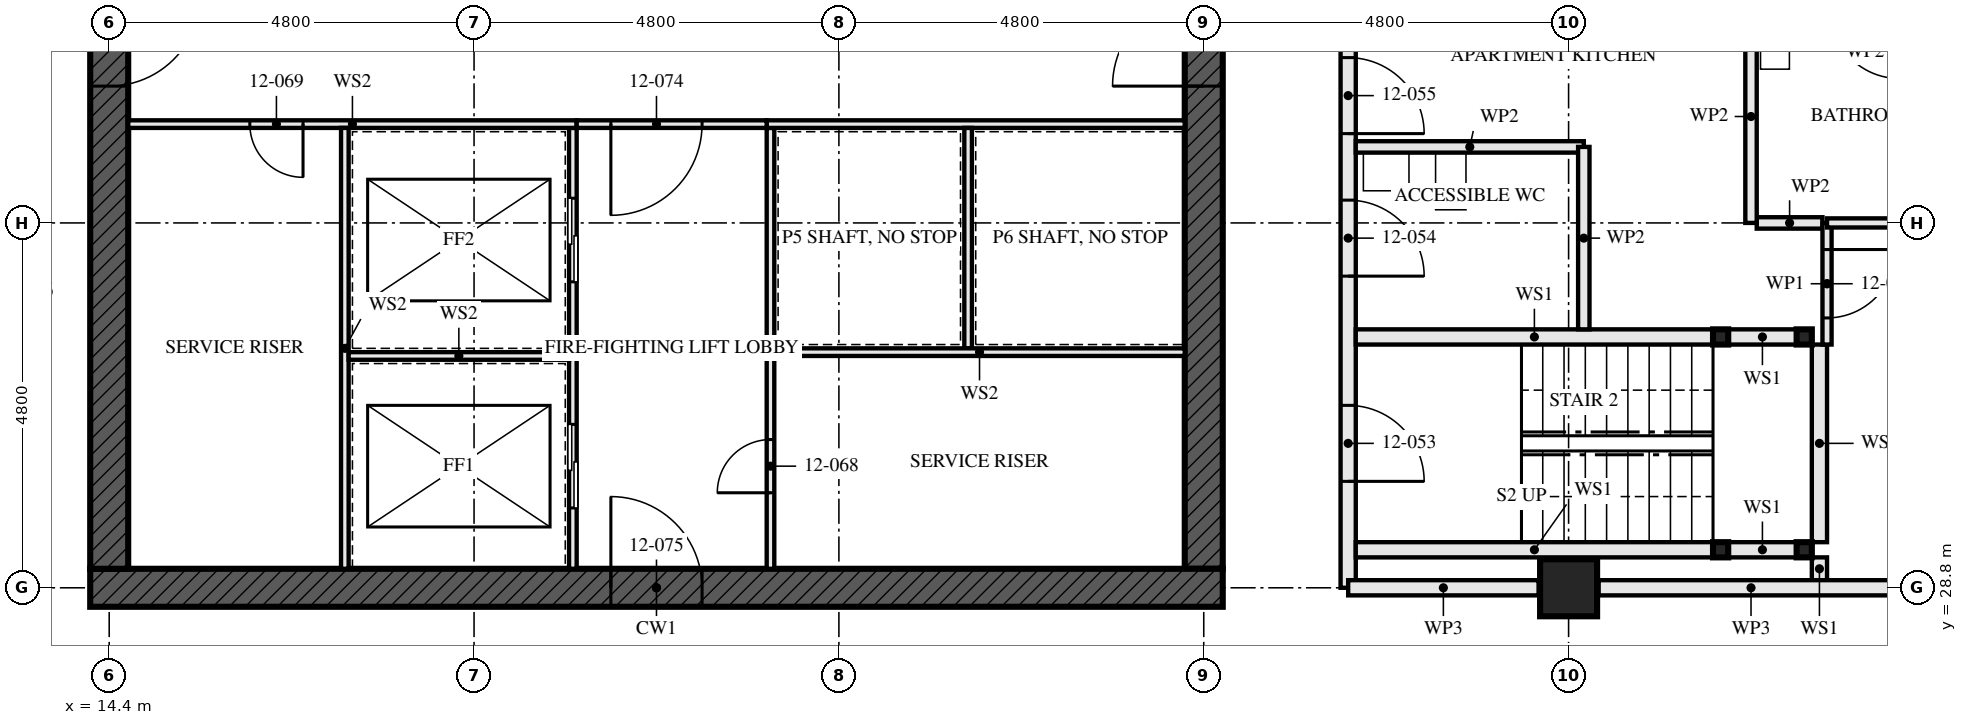
"""IFC4 building model, lengths in metres.
Left out: names, types, materials, properties, quantities, classifications, styles, units other than length and angle.
Written with IfcOpenShell. Run it as: python <this file> out.ifc"""

import sys

from ifc_helpers import new_model, si_unit, direction, frame, frame_2d, origin, origin_2d, place, context, subcontext, project, spatial, rectangle, hollow_rectangle, extrude, element, fill, save


model = new_model("IFC4")
c1 = context("Model", 3, precision=1e-05, world=origin(), true_north=direction((0.0, 1.0)))
c2 = subcontext(c1, "Body", "Model", "MODEL_VIEW")
j1 = project(units=[si_unit("LENGTHUNIT", "METRE"), si_unit("PLANEANGLEUNIT", "RADIAN")], contexts=[c1])
p1 = place(None, origin())
s1 = spatial("IfcSite", under=j1, at=p1, CompositionType="ELEMENT")
p2 = place(p1, origin())
s2 = spatial("IfcBuilding", under=s1, at=p2, CompositionType="ELEMENT")
p3 = place(p2, frame((0.0, 0.0, 48.0)))
s3 = spatial("IfcBuildingStorey", under=s2, at=p3, CompositionType="ELEMENT", Elevation=48.0)
p4 = place(p3, frame((33.6, 28.8, 0.0), z_axis=(0.0, 0.0, 1.0), x_axis=(0.0, 1.0, 0.0)))
e1 = element("IfcColumn", 1, at=p4, inside=s3, PredefinedType="COLUMN", context=c2, shape_type="SweptSolid", body=[
    extrude(hollow_rectangle(XDim=0.75, YDim=0.75, WallThickness=0.08, at=origin_2d()), origin(), (0.0, 0.0, 1.0), 3.5),
])
p5 = place(p3, frame((14.15, 28.8, -0.17), z_axis=(0.0, 0.0, 1.0), x_axis=(1.0, 0.0, 0.0)))
e2 = element("IfcWall", 2, at=p5, inside=s3, PredefinedType="SHEAR", context=c2, shape_type="SweptSolid", body=[
    extrude(rectangle(XDim=14.9, YDim=0.5, at=frame_2d((7.45, 0.0))), origin(), (0.0, 0.0, 1.0), 3.5),
])
p6 = place(p5, frame((6.85, 0.0, 0.17)))
e3 = element("IfcOpeningElement", 3, at=p6, cuts=e2, PredefinedType="OPENING", context=c2, shape_type="SweptSolid", body=[
    extrude(rectangle(XDim=1.2, YDim=2.1, at=frame_2d((0.6, 1.05))), frame((0.0, 0.26, 0.0), z_axis=(0.0, -1.0, 0.0), x_axis=(1.0, 0.0, 0.0)), (0.0, 0.0, 1.0), 0.521),
])
p7 = place(p3, frame((14.4, 42.95, -0.17), z_axis=(0.0, 0.0, 1.0), x_axis=(0.0, -1.0, 0.0)))
e4 = element("IfcWall", 4, at=p7, inside=s3, PredefinedType="SHEAR", context=c2, shape_type="SweptSolid", body=[
    extrude(rectangle(XDim=13.9, YDim=0.5, at=frame_2d((6.95, 0.0))), origin(), (0.0, 0.0, 1.0), 3.5),
])
p8 = place(p7, frame((6.35, 0.0, 0.17)))
e5 = element("IfcOpeningElement", 5, at=p8, cuts=e4, PredefinedType="OPENING", context=c2, shape_type="SweptSolid", body=[
    extrude(rectangle(XDim=1.2, YDim=2.1, at=frame_2d((0.6, 1.05))), frame((0.0, 0.26, 0.0), z_axis=(0.0, -1.0, 0.0), x_axis=(1.0, 0.0, 0.0)), (0.0, 0.0, 1.0), 0.521),
])
p9 = place(p3, frame((28.8, 29.05, -0.17), z_axis=(0.0, 0.0, 1.0), x_axis=(0.0, 1.0, 0.0)))
e6 = element("IfcWall", 6, at=p9, inside=s3, PredefinedType="SHEAR", context=c2, shape_type="SweptSolid", body=[
    extrude(rectangle(XDim=13.9, YDim=0.5, at=frame_2d((6.95, 0.0))), origin(), (0.0, 0.0, 1.0), 3.5),
])
p10 = place(p9, frame((6.35, 0.0, 0.17)))
e7 = element("IfcOpeningElement", 7, at=p10, cuts=e6, PredefinedType="OPENING", context=c2, shape_type="SweptSolid", body=[
    extrude(rectangle(XDim=1.2, YDim=2.1, at=frame_2d((0.6, 1.05))), frame((0.0, 0.26, 0.0), z_axis=(0.0, -1.0, 0.0), x_axis=(1.0, 0.0, 0.0)), (0.0, 0.0, 1.0), 0.521),
])
for number, where, z_axis, x_axis in (
    (8, (36.7, 29.3, 0.0), (0.0, 0.0, 1.0), (1.0, 0.0, 0.0)),
    (9, (36.7, 32.1, 0.0), (0.0, 0.0, 1.0), (1.0, 0.0, 0.0)),
    (10, (35.6, 29.3, 0.0), (0.0, 0.0, 1.0), (1.0, 0.0, 0.0)),
    (11, (35.6, 32.1, 0.0), (0.0, 0.0, 1.0), (1.0, 0.0, 0.0)),
):
    element("IfcColumn", number, at=place(p3, frame(where, z_axis=z_axis, x_axis=x_axis)), inside=s3, PredefinedType="COLUMN", context=c2, shape_type="SweptSolid", body=[
        extrude(hollow_rectangle(XDim=0.2, YDim=0.2, WallThickness=0.008, at=origin_2d()), origin(), (0.0, 0.0, 1.0), 3.33),
    ])
p11 = place(p3, frame((36.6, 29.3, 0.0), z_axis=(0.0, 0.0, 1.0), x_axis=(-1.0, 0.0, 0.0)))
e12 = element("IfcWall", 12, at=p11, inside=s3, PredefinedType="SOLIDWALL", context=c2, shape_type="SweptSolid", body=[
    extrude(rectangle(XDim=0.9, YDim=0.2, at=frame_2d((0.45, 0.0))), origin(), (0.0, 0.0, 1.0), 2.99),
])
p12 = place(p3, frame((35.5, 29.3, 0.0), z_axis=(0.0, 0.0, 1.0), x_axis=(-1.0, 0.0, 0.0)))
e13 = element("IfcWall", 13, at=p12, inside=s3, PredefinedType="SOLIDWALL", context=c2, shape_type="SweptSolid", body=[
    extrude(rectangle(XDim=4.7, YDim=0.2, at=frame_2d((2.35, 0.0))), origin(), (0.0, 0.0, 1.0), 2.99),
])
p13 = place(p3, frame((36.6, 32.1, 0.0), z_axis=(0.0, 0.0, 1.0), x_axis=(-1.0, 0.0, 0.0)))
e14 = element("IfcWall", 14, at=p13, inside=s3, PredefinedType="SOLIDWALL", context=c2, shape_type="SweptSolid", body=[
    extrude(rectangle(XDim=0.9, YDim=0.2, at=frame_2d((0.45, 0.0))), origin(), (0.0, 0.0, 1.0), 2.99),
])
p14 = place(p3, frame((35.5, 32.1, 0.0), z_axis=(0.0, 0.0, 1.0), x_axis=(-1.0, 0.0, 0.0)))
e15 = element("IfcWall", 15, at=p14, inside=s3, PredefinedType="SOLIDWALL", context=c2, shape_type="SweptSolid", body=[
    extrude(rectangle(XDim=4.7, YDim=0.2, at=frame_2d((2.35, 0.0))), origin(), (0.0, 0.0, 1.0), 2.99),
])
p15 = place(p3, frame((36.9, 28.9, 0.0), z_axis=(0.0, 0.0, 1.0), x_axis=(0.0, 1.0, 0.0)))
e16 = element("IfcWall", 16, at=p15, inside=s3, PredefinedType="SOLIDWALL", context=c2, shape_type="SweptSolid", body=[
    extrude(rectangle(XDim=0.3, YDim=0.2, at=frame_2d((0.15, 0.0))), origin(), (0.0, 0.0, 1.0), 3.33),
])
p16 = place(p3, frame((36.9, 29.4, 0.0), z_axis=(0.0, 0.0, 1.0), x_axis=(0.0, 1.0, 0.0)))
e17 = element("IfcWall", 17, at=p16, inside=s3, PredefinedType="SOLIDWALL", context=c2, shape_type="SweptSolid", body=[
    extrude(rectangle(XDim=2.6, YDim=0.2, at=frame_2d((1.3, 0.0))), origin(), (0.0, 0.0, 1.0), 3.33),
])
p17 = place(p3, frame((33.8, 32.2, 0.0), z_axis=(0.0, 0.0, 1.0), x_axis=(0.0, 1.0, 0.0)))
e18 = element("IfcWall", 18, at=p17, inside=s3, PredefinedType="PARTITIONING", context=c2, shape_type="SweptSolid", body=[
    extrude(rectangle(XDim=2.4, YDim=0.15, at=frame_2d((1.2, 0.0))), origin(), (0.0, 0.0, 1.0), 2.55),
])
p18 = place(p3, frame((33.8, 34.6, 0.0), z_axis=(0.0, 0.0, 1.0), x_axis=(-1.0, 0.0, 0.0)))
e19 = element("IfcWall", 19, at=p18, inside=s3, PredefinedType="PARTITIONING", context=c2, shape_type="SweptSolid", body=[
    extrude(rectangle(XDim=3.0, YDim=0.15, at=frame_2d((1.5, 0.0))), origin(), (0.0, 0.0, 1.0), 3.33),
])
p19 = place(p3, frame((36.0, 33.6, 0.0), z_axis=(0.0, 0.0, 1.0), x_axis=(0.0, 1.0, 0.0)))
e20 = element("IfcWall", 20, at=p19, inside=s3, PredefinedType="PARTITIONING", context=c2, shape_type="SweptSolid", body=[
    extrude(rectangle(XDim=2.8, YDim=0.15, at=frame_2d((1.4, 0.0))), origin(), (0.0, 0.0, 1.0), 3.33),
])
p20 = place(p3, frame((37.0, 32.0, 0.0), z_axis=(0.0, 0.0, 1.0), x_axis=(0.0, 1.0, 0.0)))
e21 = element("IfcWall", 21, at=p20, inside=s3, PredefinedType="PARTITIONING", context=c2, shape_type="SweptSolid", body=[
    extrude(rectangle(XDim=1.6, YDim=0.12, at=frame_2d((0.8, 0.0))), origin(), (0.0, 0.0, 1.0), 3.33),
])
p21 = place(p20, frame((0.35, 0.0, 0.0)))
e22 = element("IfcOpeningElement", 22, at=p21, cuts=e21, PredefinedType="OPENING", context=c2, shape_type="SweptSolid", body=[
    extrude(rectangle(XDim=0.9, YDim=2.1, at=frame_2d((0.45, 1.05))), frame((0.0, 0.071, 0.0), z_axis=(0.0, -1.0, 0.0), x_axis=(1.0, 0.0, 0.0)), (0.0, 0.0, 1.0), 0.141),
])
p22 = place(p3, frame((42.805, 33.6, 0.0), z_axis=(0.0, 0.0, 1.0), x_axis=(-1.0, 0.0, 0.0)))
e23 = element("IfcWall", 23, at=p22, inside=s3, PredefinedType="PARTITIONING", context=c2, shape_type="SweptSolid", body=[
    extrude(rectangle(XDim=5.805, YDim=0.12, at=frame_2d((2.902, 0.0))), origin(), (0.0, 0.0, 1.0), 2.55),
])
p23 = place(p3, frame((30.7, 28.8, 0.0), z_axis=(0.0, 0.0, 1.0), x_axis=(0.0, 1.0, 0.0)))
e24 = element("IfcWall", 24, at=p23, inside=s3, PredefinedType="PARTITIONING", context=c2, shape_type="SweptSolid", body=[
    extrude(rectangle(XDim=14.4, YDim=0.2, at=frame_2d((7.2, 0.0))), origin(), (0.0, 0.0, 1.0), 2.55),
])
p24 = place(p23, frame((1.4, 0.0, 0.0)))
e25 = element("IfcOpeningElement", 25, at=p24, cuts=e24, PredefinedType="OPENING", context=c2, shape_type="SweptSolid", body=[
    extrude(rectangle(XDim=1.0, YDim=2.1, at=frame_2d((0.5, 1.05))), frame((0.0, 0.111, 0.0), z_axis=(0.0, -1.0, 0.0), x_axis=(1.0, 0.0, 0.0)), (0.0, 0.0, 1.0), 0.221),
])
p25 = place(p23, frame((4.1, 0.0, 0.0)))
e26 = element("IfcOpeningElement", 26, at=p25, cuts=e24, PredefinedType="OPENING", context=c2, shape_type="SweptSolid", body=[
    extrude(rectangle(XDim=1.0, YDim=2.1, at=frame_2d((0.5, 1.05))), frame((0.0, 0.111, 0.0), z_axis=(0.0, -1.0, 0.0), x_axis=(1.0, 0.0, 0.0)), (0.0, 0.0, 1.0), 0.221),
])
p26 = place(p23, frame((5.975, 0.0, 0.0)))
e27 = element("IfcOpeningElement", 27, at=p26, cuts=e24, PredefinedType="OPENING", context=c2, shape_type="SweptSolid", body=[
    extrude(rectangle(XDim=1.0, YDim=2.1, at=frame_2d((0.5, 1.05))), frame((0.0, 0.111, 0.0), z_axis=(0.0, -1.0, 0.0), x_axis=(1.0, 0.0, 0.0)), (0.0, 0.0, 1.0), 0.221),
])
p27 = place(p23, frame((10.0, 0.0, 0.0)))
e28 = element("IfcOpeningElement", 28, at=p27, cuts=e24, PredefinedType="OPENING", context=c2, shape_type="SweptSolid", body=[
    extrude(rectangle(XDim=1.0, YDim=2.1, at=frame_2d((0.5, 1.05))), frame((0.0, 0.111, 0.0), z_axis=(0.0, -1.0, 0.0), x_axis=(1.0, 0.0, 0.0)), (0.0, 0.0, 1.0), 0.221),
])
p28 = place(p3, frame((20.5, 29.05, 0.0), z_axis=(0.0, 0.0, 1.0), x_axis=(0.0, 1.0, 0.0)))
e29 = element("IfcWall", 29, at=p28, inside=s3, PredefinedType="SOLIDWALL", context=c2, shape_type="SweptSolid", body=[
    extrude(rectangle(XDim=5.8, YDim=0.1, at=frame_2d((2.9, 0.0))), origin(), (0.0, 0.0, 1.0), 3.33),
])
p29 = place(p28, frame((0.8, 0.0, 0.0)))
e30 = element("IfcOpeningElement", 30, at=p29, cuts=e29, PredefinedType="OPENING", context=c2, shape_type="SweptSolid", body=[
    extrude(rectangle(XDim=1.1, YDim=2.3, at=frame_2d((0.55, 1.15))), frame((0.0, 0.061, 0.0), z_axis=(0.0, -1.0, 0.0), x_axis=(1.0, 0.0, 0.0)), (0.0, 0.0, 1.0), 0.121),
])
p30 = place(p28, frame((3.775, 0.0, 0.0)))
e31 = element("IfcOpeningElement", 31, at=p30, cuts=e29, PredefinedType="OPENING", context=c2, shape_type="SweptSolid", body=[
    extrude(rectangle(XDim=1.1, YDim=2.3, at=frame_2d((0.55, 1.15))), frame((0.0, 0.061, 0.0), z_axis=(0.0, -1.0, 0.0), x_axis=(1.0, 0.0, 0.0)), (0.0, 0.0, 1.0), 0.121),
])
p31 = place(p3, frame((23.1, 29.05, 0.0), z_axis=(0.0, 0.0, 1.0), x_axis=(0.0, 1.0, 0.0)))
e32 = element("IfcWall", 32, at=p31, inside=s3, PredefinedType="SOLIDWALL", context=c2, shape_type="SweptSolid", body=[
    extrude(rectangle(XDim=5.8, YDim=0.1, at=frame_2d((2.9, 0.0))), origin(), (0.0, 0.0, 1.0), 3.33),
])
p32 = place(p31, frame((1.0, 0.0, 0.0)))
e33 = element("IfcOpeningElement", 33, at=p32, cuts=e32, PredefinedType="OPENING", context=c2, shape_type="SweptSolid", body=[
    extrude(rectangle(XDim=0.7, YDim=2.1, at=frame_2d((0.35, 1.05))), frame((0.0, 0.061, 0.0), z_axis=(0.0, -1.0, 0.0), x_axis=(1.0, 0.0, 0.0)), (0.0, 0.0, 1.0), 0.121),
])
p33 = place(p3, frame((14.65, 34.9, 0.0), z_axis=(0.0, 0.0, 1.0), x_axis=(1.0, 0.0, 0.0)))
e34 = element("IfcWall", 34, at=p33, inside=s3, PredefinedType="SOLIDWALL", context=c2, shape_type="SweptSolid", body=[
    extrude(rectangle(XDim=5.9, YDim=0.1, at=frame_2d((2.95, 0.0))), origin(), (0.0, 0.0, 1.0), 3.33),
])
p34 = place(p33, frame((1.6, 0.0, 0.0)))
e35 = element("IfcOpeningElement", 35, at=p34, cuts=e34, PredefinedType="OPENING", context=c2, shape_type="SweptSolid", body=[
    extrude(rectangle(XDim=0.7, YDim=2.1, at=frame_2d((0.35, 1.05))), frame((0.0, 0.061, 0.0), z_axis=(0.0, -1.0, 0.0), x_axis=(1.0, 0.0, 0.0)), (0.0, 0.0, 1.0), 0.121),
])
p35 = place(p3, frame((23.05, 34.9, 0.0), z_axis=(0.0, 0.0, 1.0), x_axis=(1.0, 0.0, 0.0)))
e36 = element("IfcWall", 36, at=p35, inside=s3, PredefinedType="SOLIDWALL", context=c2, shape_type="SweptSolid", body=[
    extrude(rectangle(XDim=5.5, YDim=0.1, at=frame_2d((2.75, 0.0))), origin(), (0.0, 0.0, 1.0), 3.33),
])
p36 = place(p3, frame((20.55, 34.9, 0.0), z_axis=(0.0, 0.0, 1.0), x_axis=(1.0, 0.0, 0.0)))
e37 = element("IfcWall", 37, at=p36, inside=s3, PredefinedType="SOLIDWALL", context=c2, shape_type="SweptSolid", body=[
    extrude(rectangle(XDim=2.5, YDim=0.1, at=frame_2d((1.25, 0.0))), origin(), (0.0, 0.0, 1.0), 3.33),
])
p37 = place(p36, frame((0.45, 0.0, 0.0)))
e38 = element("IfcOpeningElement", 38, at=p37, cuts=e37, PredefinedType="OPENING", context=c2, shape_type="SweptSolid", body=[
    extrude(rectangle(XDim=1.2, YDim=2.1, at=frame_2d((0.6, 1.05))), frame((0.0, 0.061, 0.0), z_axis=(0.0, -1.0, 0.0), x_axis=(1.0, 0.0, 0.0)), (0.0, 0.0, 1.0), 0.121),
])
p38 = place(p3, frame((17.5, 29.05, 0.0), z_axis=(0.0, 0.0, 1.0), x_axis=(0.0, 1.0, 0.0)))
e39 = element("IfcWall", 39, at=p38, inside=s3, PredefinedType="SOLIDWALL", context=c2, shape_type="SweptSolid", body=[
    extrude(rectangle(XDim=5.8, YDim=0.1, at=frame_2d((2.9, 0.0))), origin(), (0.0, 0.0, 1.0), 3.33),
])
p39 = place(p3, frame((17.55, 31.85, 0.0), z_axis=(0.0, 0.0, 1.0), x_axis=(1.0, 0.0, 0.0)))
e40 = element("IfcWall", 40, at=p39, inside=s3, PredefinedType="SOLIDWALL", context=c2, shape_type="SweptSolid", body=[
    extrude(rectangle(XDim=2.9, YDim=0.1, at=frame_2d((1.45, 0.0))), origin(), (0.0, 0.0, 1.0), 3.33),
])
p40 = place(p3, frame((25.7, 31.95, 0.0), z_axis=(0.0, 0.0, 1.0), x_axis=(0.0, 1.0, 0.0)))
e41 = element("IfcWall", 41, at=p40, inside=s3, PredefinedType="SOLIDWALL", context=c2, shape_type="SweptSolid", body=[
    extrude(rectangle(XDim=2.9, YDim=0.1, at=frame_2d((1.45, 0.0))), origin(), (0.0, 0.0, 1.0), 3.33),
])
p41 = place(p3, frame((23.15, 31.9, 0.0), z_axis=(0.0, 0.0, 1.0), x_axis=(1.0, 0.0, 0.0)))
e42 = element("IfcWall", 42, at=p41, inside=s3, PredefinedType="SOLIDWALL", context=c2, shape_type="SweptSolid", body=[
    extrude(rectangle(XDim=5.4, YDim=0.1, at=frame_2d((2.7, 0.0))), origin(), (0.0, 0.0, 1.0), 3.33),
])
p42 = place(p3, frame((38.005, 28.8, 0.0), z_axis=(0.0, 0.0, 1.0), x_axis=(-1.0, 0.0, 0.0)))
e43 = element("IfcWall", 43, at=p42, inside=s3, PredefinedType="PARTITIONING", context=c2, shape_type="SweptSolid", body=[
    extrude(rectangle(XDim=4.01, YDim=0.2, at=frame_2d((2.005, 0.0))), origin(), (0.0, 0.0, 1.0), 2.32),
])
p43 = place(p3, frame((33.205, 28.8, 0.0), z_axis=(0.0, 0.0, 1.0), x_axis=(-1.0, 0.0, 0.0)))
e44 = element("IfcWall", 44, at=p43, inside=s3, PredefinedType="PARTITIONING", context=c2, shape_type="SweptSolid", body=[
    extrude(rectangle(XDim=2.505, YDim=0.2, at=frame_2d((1.252, 0.0))), origin(), (0.0, 0.0, 1.0), 2.32),
])
p44 = place(p3, frame((36.94, 33.6, 0.0), z_axis=(0.0, 0.0, 1.0), x_axis=(-1.0, 0.0, 0.0)))
e45 = element("IfcWall", 45, at=p44, inside=s3, PredefinedType="PARTITIONING", context=c2, shape_type="SweptSolid", body=[
    extrude(rectangle(XDim=0.865, YDim=0.15, at=frame_2d((0.433, 0.0))), origin(), (0.0, 0.0, 1.0), 2.55),
])
p45 = place(p21, frame((0.9, 0.0, 0.0), z_axis=(0.0, 0.0, 1.0), x_axis=(-1.0, 0.0, 0.0)))
e46 = element("IfcDoor", 46, at=p45, inside=s3, OperationType="SINGLE_SWING_RIGHT", PredefinedType="DOOR", context=c2, shape_type="SweptSolid", body=[
    extrude(rectangle(XDim=0.9, YDim=2.1, at=frame_2d((0.45, 1.05))), frame((0.0, 0.022, 0.0), z_axis=(0.0, -1.0, 0.0), x_axis=(1.0, 0.0, 0.0)), (0.0, 0.0, 1.0), 0.044),
])
fill(e22, e46)
p46 = place(p24, frame((1.0, 0.0, 0.0), z_axis=(0.0, 0.0, 1.0), x_axis=(-1.0, 0.0, 0.0)))
e47 = element("IfcDoor", 47, at=p46, inside=s3, OperationType="SINGLE_SWING_LEFT", PredefinedType="DOOR", context=c2, shape_type="SweptSolid", body=[
    extrude(rectangle(XDim=1.0, YDim=2.1, at=frame_2d((0.5, 1.05))), frame((0.0, 0.032, 0.0), z_axis=(0.0, -1.0, 0.0), x_axis=(1.0, 0.0, 0.0)), (0.0, 0.0, 1.0), 0.064),
])
fill(e25, e47)
p47 = place(p25, frame((1.0, 0.0, 0.0), z_axis=(0.0, 0.0, 1.0), x_axis=(-1.0, 0.0, 0.0)))
e48 = element("IfcDoor", 48, at=p47, inside=s3, OperationType="SINGLE_SWING_LEFT", PredefinedType="DOOR", context=c2, shape_type="SweptSolid", body=[
    extrude(rectangle(XDim=1.0, YDim=2.1, at=frame_2d((0.5, 1.05))), frame((0.0, 0.027, 0.0), z_axis=(0.0, -1.0, 0.0), x_axis=(1.0, 0.0, 0.0)), (0.0, 0.0, 1.0), 0.054),
])
fill(e26, e48)
p48 = place(p26, frame((1.0, 0.0, 0.0), z_axis=(0.0, 0.0, 1.0), x_axis=(-1.0, 0.0, 0.0)))
e49 = element("IfcDoor", 49, at=p48, inside=s3, OperationType="SINGLE_SWING_LEFT", PredefinedType="DOOR", context=c2, shape_type="SweptSolid", body=[
    extrude(rectangle(XDim=1.0, YDim=2.1, at=frame_2d((0.5, 1.05))), frame((0.0, 0.027, 0.0), z_axis=(0.0, -1.0, 0.0), x_axis=(1.0, 0.0, 0.0)), (0.0, 0.0, 1.0), 0.054),
])
fill(e27, e49)
p49 = place(p29, origin())
e50 = element("IfcDoor", 50, at=p49, inside=s3, OperationType="SLIDING_TO_LEFT", PredefinedType="DOOR", context=c2, shape_type="SweptSolid", body=[
    extrude(rectangle(XDim=1.1, YDim=2.3, at=frame_2d((0.55, 1.15))), frame((0.0, 0.05, 0.0), z_axis=(0.0, -1.0, 0.0), x_axis=(1.0, 0.0, 0.0)), (0.0, 0.0, 1.0), 0.1),
])
fill(e30, e50)
p50 = place(p30, origin())
e51 = element("IfcDoor", 51, at=p50, inside=s3, OperationType="SLIDING_TO_LEFT", PredefinedType="DOOR", context=c2, shape_type="SweptSolid", body=[
    extrude(rectangle(XDim=1.1, YDim=2.3, at=frame_2d((0.55, 1.15))), frame((0.0, 0.05, 0.0), z_axis=(0.0, -1.0, 0.0), x_axis=(1.0, 0.0, 0.0)), (0.0, 0.0, 1.0), 0.1),
])
fill(e31, e51)
p51 = place(p32, origin())
e52 = element("IfcDoor", 52, at=p51, inside=s3, OperationType="SINGLE_SWING_RIGHT", PredefinedType="DOOR", context=c2, shape_type="SweptSolid", body=[
    extrude(rectangle(XDim=0.7, YDim=2.1, at=frame_2d((0.35, 1.05))), frame((0.0, 0.027, 0.0), z_axis=(0.0, -1.0, 0.0), x_axis=(1.0, 0.0, 0.0)), (0.0, 0.0, 1.0), 0.054),
])
fill(e33, e52)
p52 = place(p34, frame((0.7, 0.0, 0.0), z_axis=(0.0, 0.0, 1.0), x_axis=(-1.0, 0.0, 0.0)))
e53 = element("IfcDoor", 53, at=p52, inside=s3, OperationType="SINGLE_SWING_RIGHT", PredefinedType="DOOR", context=c2, shape_type="SweptSolid", body=[
    extrude(rectangle(XDim=0.7, YDim=2.1, at=frame_2d((0.35, 1.05))), frame((0.0, 0.027, 0.0), z_axis=(0.0, -1.0, 0.0), x_axis=(1.0, 0.0, 0.0)), (0.0, 0.0, 1.0), 0.054),
])
fill(e35, e53)
p53 = place(p37, frame((1.2, 0.0, 0.0), z_axis=(0.0, 0.0, 1.0), x_axis=(-1.0, 0.0, 0.0)))
e54 = element("IfcDoor", 54, at=p53, inside=s3, OperationType="SINGLE_SWING_LEFT", PredefinedType="DOOR", context=c2, shape_type="SweptSolid", body=[
    extrude(rectangle(XDim=1.2, YDim=2.1, at=frame_2d((0.6, 1.05))), frame((0.0, 0.027, 0.0), z_axis=(0.0, -1.0, 0.0), x_axis=(1.0, 0.0, 0.0)), (0.0, 0.0, 1.0), 0.054),
])
fill(e38, e54)
p54 = place(p6, origin())
e55 = element("IfcDoor", 55, at=p54, inside=s3, OperationType="SINGLE_SWING_LEFT", PredefinedType="DOOR", context=c2, shape_type="SweptSolid", body=[
    extrude(rectangle(XDim=1.2, YDim=2.1, at=frame_2d((0.6, 1.05))), frame((0.0, 0.027, 0.0), z_axis=(0.0, -1.0, 0.0), x_axis=(1.0, 0.0, 0.0)), (0.0, 0.0, 1.0), 0.054),
])
fill(e3, e55)
p55 = place(p8, origin())
e56 = element("IfcDoor", 56, at=p55, inside=s3, OperationType="SINGLE_SWING_LEFT", PredefinedType="DOOR", context=c2, shape_type="SweptSolid", body=[
    extrude(rectangle(XDim=1.2, YDim=2.1, at=frame_2d((0.6, 1.05))), frame((0.0, 0.027, 0.0), z_axis=(0.0, -1.0, 0.0), x_axis=(1.0, 0.0, 0.0)), (0.0, 0.0, 1.0), 0.054),
])
fill(e5, e56)
p56 = place(p10, origin())
e57 = element("IfcDoor", 57, at=p56, inside=s3, OperationType="SINGLE_SWING_LEFT", PredefinedType="DOOR", context=c2, shape_type="SweptSolid", body=[
    extrude(rectangle(XDim=1.2, YDim=2.1, at=frame_2d((0.6, 1.05))), frame((0.0, 0.027, 0.0), z_axis=(0.0, -1.0, 0.0), x_axis=(1.0, 0.0, 0.0)), (0.0, 0.0, 1.0), 0.054),
])
fill(e7, e57)
save(model, sys.argv[1])
